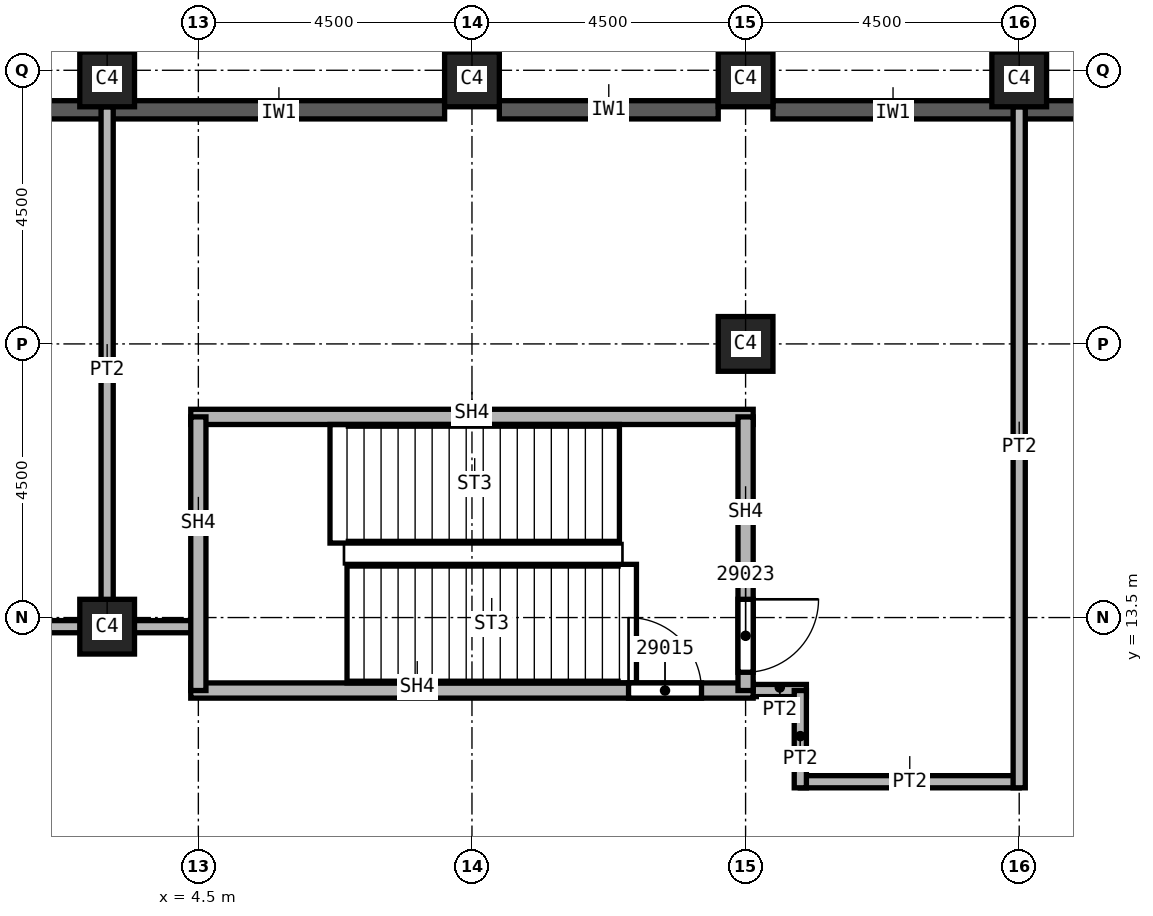
"""IFC4 building model, lengths in metres.
Left out: names, types, materials, properties, quantities, classifications, styles, units other than length and angle.
Written with IfcOpenShell. Run it as: python <this file> out.ifc"""

import sys

from ifc_helpers import new_model, si_unit, direction, frame, frame_2d, origin, origin_2d, place, context, subcontext, project, spatial, rectangle, extrude, element, fill, save


model = new_model("IFC4")
c1 = context("Model", 3, precision=1e-05, world=origin(), true_north=direction((0.0, 1.0)))
c2 = subcontext(c1, "Body", "Model", "MODEL_VIEW")
j1 = project(units=[si_unit("LENGTHUNIT", "METRE"), si_unit("PLANEANGLEUNIT", "RADIAN")], contexts=[c1])
p1 = place(None, origin())
s1 = spatial("IfcSite", under=j1, at=p1, CompositionType="ELEMENT")
p2 = place(p1, origin())
s2 = spatial("IfcBuilding", under=s1, at=p2, CompositionType="ELEMENT")
p3 = place(p2, frame((0.0, 0.0, 294.0)))
s3 = spatial("IfcBuildingStorey", under=s2, at=p3, CompositionType="ELEMENT", Elevation=294.0)
p4 = place(p3, frame((13.5, 18.0, 0.0), z_axis=(0.0, 0.0, 1.0), x_axis=(1.0, 0.0, 0.0)))
e1 = element("IfcColumn", 1, at=p4, inside=s3, PredefinedType="COLUMN", context=c2, shape_type="SweptSolid", body=[
    extrude(rectangle(XDim=0.9, YDim=0.9, at=origin_2d()), origin(), (0.0, 0.0, 1.0), 5.74),
])
for number, where, z_axis, x_axis in (
    (2, (3.0, 22.35, 0.0), (0.0, 0.18, 0.984), (-1.0, 0.0, 0.0)),
    (3, (9.0, 22.35, 0.0), (0.0, 0.18, 0.984), (-1.0, 0.0, 0.0)),
    (4, (13.5, 22.35, 0.0), (0.0, 0.18, 0.984), (-1.0, 0.0, 0.0)),
    (5, (18.0, 22.35, 0.0), (0.0, 0.18, 0.984), (-1.0, 0.0, 0.0)),
    (6, (3.0, 13.35, 0.0), (0.0, 0.18, 0.984), (-1.0, 0.0, 0.0)),
):
    element("IfcColumn", number, at=place(p3, frame(where, z_axis=z_axis, x_axis=x_axis)), inside=s3, PredefinedType="COLUMN", context=c2, shape_type="SweptSolid", body=[
        extrude(rectangle(XDim=0.9, YDim=0.9, at=origin_2d()), origin(), (0.0, 0.0, 1.0), 5.835),
    ])
for number, where, z_axis, x_axis in (
    (7, (22.05, 21.85, 0.0), (0.0, 0.0, 1.0), (-1.0, 0.0, 0.0)),
    (8, (17.95, 21.85, 0.0), (0.0, 0.0, 1.0), (-1.0, 0.0, 0.0)),
):
    element("IfcWall", number, at=place(p3, frame(where, z_axis=z_axis, x_axis=x_axis)), inside=s3, PredefinedType="SOLIDWALL", context=c2, shape_type="SweptSolid", body=[
        extrude(rectangle(XDim=4.0, YDim=0.3, at=frame_2d((2.0, 0.0))), origin(), (0.0, 0.0, 1.0), 5.14),
    ])
p5 = place(p3, frame((13.05, 21.85, 0.0), z_axis=(0.0, 0.0, 1.0), x_axis=(-1.0, 0.0, 0.0)))
e9 = element("IfcWall", 9, at=p5, inside=s3, PredefinedType="SOLIDWALL", context=c2, shape_type="SweptSolid", body=[
    extrude(rectangle(XDim=3.6, YDim=0.3, at=frame_2d((1.8, 0.0))), origin(), (0.0, 0.0, 1.0), 5.14),
])
for number, where, z_axis, x_axis in (
    (10, (8.55, 21.85, 0.0), (0.0, 0.0, 1.0), (-1.0, 0.0, 0.0)),
    (11, (2.95, 21.85, 0.0), (0.0, 0.0, 1.0), (-1.0, 0.0, 0.0)),
):
    element("IfcWall", number, at=place(p3, frame(where, z_axis=z_axis, x_axis=x_axis)), inside=s3, PredefinedType="SOLIDWALL", context=c2, shape_type="SweptSolid", body=[
        extrude(rectangle(XDim=5.5, YDim=0.3, at=frame_2d((2.75, 0.0))), origin(), (0.0, 0.0, 1.0), 5.14),
    ])
p6 = place(p3, frame((-4.5, 13.35, 0.0), z_axis=(0.0, 0.0, 1.0), x_axis=(1.0, 0.0, 0.0)))
e12 = element("IfcWall", 12, at=p6, inside=s3, PredefinedType="PARTITIONING", context=c2, shape_type="SweptSolid", body=[
    extrude(rectangle(XDim=9.0, YDim=0.2, at=frame_2d((4.5, 0.0))), origin(), (0.0, 0.0, 1.0), 5.74),
])
p7 = place(p3, frame((3.0, 21.9, 0.0), z_axis=(0.0, 0.0, 1.0), x_axis=(0.0, -1.0, 0.0)))
e13 = element("IfcWall", 13, at=p7, inside=s3, PredefinedType="PARTITIONING", context=c2, shape_type="SweptSolid", body=[
    extrude(rectangle(XDim=8.55, YDim=0.2, at=frame_2d((4.275, 0.0))), origin(), (0.0, 0.0, 1.0), 5.74),
])
p8 = place(p3, frame((13.375, 12.3, 0.0), z_axis=(0.0, 0.0, 1.0), x_axis=(1.0, 0.0, 0.0)))
e14 = element("IfcWall", 14, at=p8, inside=s3, PredefinedType="PARTITIONING", context=c2, shape_type="SweptSolid", body=[
    extrude(rectangle(XDim=1.125, YDim=0.2, at=frame_2d((0.562, 0.0))), origin(), (0.0, 0.0, 1.0), 5.74),
])
p9 = place(p3, frame((14.4, 10.8, 0.0), z_axis=(0.0, 0.0, 1.0), x_axis=(1.0, 0.0, 0.0)))
e15 = element("IfcWall", 15, at=p9, inside=s3, PredefinedType="PARTITIONING", context=c2, shape_type="SweptSolid", body=[
    extrude(rectangle(XDim=3.6, YDim=0.2, at=frame_2d((1.8, 0.0))), origin(), (0.0, 0.0, 1.0), 5.74),
])
p10 = place(p3, frame((14.4, 12.3, 0.0), z_axis=(0.0, 0.0, 1.0), x_axis=(0.0, -1.0, 0.0)))
e16 = element("IfcWall", 16, at=p10, inside=s3, PredefinedType="PARTITIONING", context=c2, shape_type="SweptSolid", body=[
    extrude(rectangle(XDim=1.6, YDim=0.2, at=frame_2d((0.8, 0.0))), origin(), (0.0, 0.0, 1.0), 5.74),
])
p11 = place(p3, frame((18.0, 10.7, 0.0), z_axis=(0.0, 0.0, 1.0), x_axis=(0.0, 1.0, 0.0)))
e17 = element("IfcWall", 17, at=p11, inside=s3, PredefinedType="PARTITIONING", context=c2, shape_type="SweptSolid", body=[
    extrude(rectangle(XDim=11.2, YDim=0.2, at=frame_2d((5.6, 0.0))), origin(), (0.0, 0.0, 1.0), 5.74),
])
p12 = place(p3, frame((4.375, 12.3, 0.0), z_axis=(0.0, 0.0, 1.0), x_axis=(1.0, 0.0, 0.0)))
e18 = element("IfcWall", 18, at=p12, inside=s3, PredefinedType="SOLIDWALL", context=c2, shape_type="SweptSolid", body=[
    extrude(rectangle(XDim=9.25, YDim=0.25, at=frame_2d((4.625, 0.0))), origin(), (0.0, 0.0, 1.0), 5.74),
])
p13 = place(p12, frame((7.2, 0.0, 0.0)))
e19 = element("IfcOpeningElement", 19, at=p13, cuts=e18, PredefinedType="OPENING", context=c2, shape_type="SweptSolid", body=[
    extrude(rectangle(XDim=1.2, YDim=2.1, at=frame_2d((0.6, 1.05))), frame((0.0, 0.125, 0.0), z_axis=(0.0, -1.0, 0.0), x_axis=(1.0, 0.0, 0.0)), (0.0, 0.0, 1.0), 0.25),
])
p14 = place(p3, frame((4.375, 16.8, 0.0), z_axis=(0.0, 0.0, 1.0), x_axis=(1.0, 0.0, 0.0)))
e20 = element("IfcWall", 20, at=p14, inside=s3, PredefinedType="SOLIDWALL", context=c2, shape_type="SweptSolid", body=[
    extrude(rectangle(XDim=9.25, YDim=0.25, at=frame_2d((4.625, 0.0))), origin(), (0.0, 0.0, 1.0), 5.74),
])
p15 = place(p3, frame((4.5, 12.3, 0.0), z_axis=(0.0, 0.0, 1.0), x_axis=(0.0, 1.0, 0.0)))
e21 = element("IfcWall", 21, at=p15, inside=s3, PredefinedType="SOLIDWALL", context=c2, shape_type="SweptSolid", body=[
    extrude(rectangle(XDim=4.5, YDim=0.25, at=frame_2d((2.25, 0.0))), origin(), (0.0, 0.0, 1.0), 5.74),
])
p16 = place(p3, frame((13.5, 16.8, 0.0), z_axis=(0.0, 0.0, 1.0), x_axis=(0.0, -1.0, 0.0)))
e22 = element("IfcWall", 22, at=p16, inside=s3, PredefinedType="SOLIDWALL", context=c2, shape_type="SweptSolid", body=[
    extrude(rectangle(XDim=4.5, YDim=0.25, at=frame_2d((2.25, 0.0))), origin(), (0.0, 0.0, 1.0), 5.74),
])
p17 = place(p16, frame((3.0, 0.0, 0.0)))
e23 = element("IfcOpeningElement", 23, at=p17, cuts=e22, PredefinedType="OPENING", context=c2, shape_type="SweptSolid", body=[
    extrude(rectangle(XDim=1.2, YDim=2.1, at=frame_2d((0.6, 1.05))), frame((0.0, 0.125, 0.0), z_axis=(0.0, -1.0, 0.0), x_axis=(1.0, 0.0, 0.0)), (0.0, 0.0, 1.0), 0.25),
])
p18 = place(p13, origin())
e24 = element("IfcDoor", 24, at=p18, inside=s3, OperationType="SINGLE_SWING_RIGHT", PredefinedType="DOOR", context=c2, shape_type="SweptSolid", body=[
    extrude(rectangle(XDim=1.2, YDim=2.1, at=frame_2d((0.6, 1.05))), frame((0.0, 0.025, 0.0), z_axis=(0.0, -1.0, 0.0), x_axis=(1.0, 0.0, 0.0)), (0.0, 0.0, 1.0), 0.05),
])
fill(e19, e24)
p19 = place(p17, origin())
e25 = element("IfcDoor", 25, at=p19, inside=s3, OperationType="SINGLE_SWING_RIGHT", PredefinedType="DOOR", context=c2, shape_type="SweptSolid", body=[
    extrude(rectangle(XDim=1.2, YDim=2.1, at=frame_2d((0.6, 1.05))), frame((0.0, 0.025, 0.0), z_axis=(0.0, -1.0, 0.0), x_axis=(1.0, 0.0, 0.0)), (0.0, 0.0, 1.0), 0.05),
])
fill(e23, e25)
save(model, sys.argv[1])
